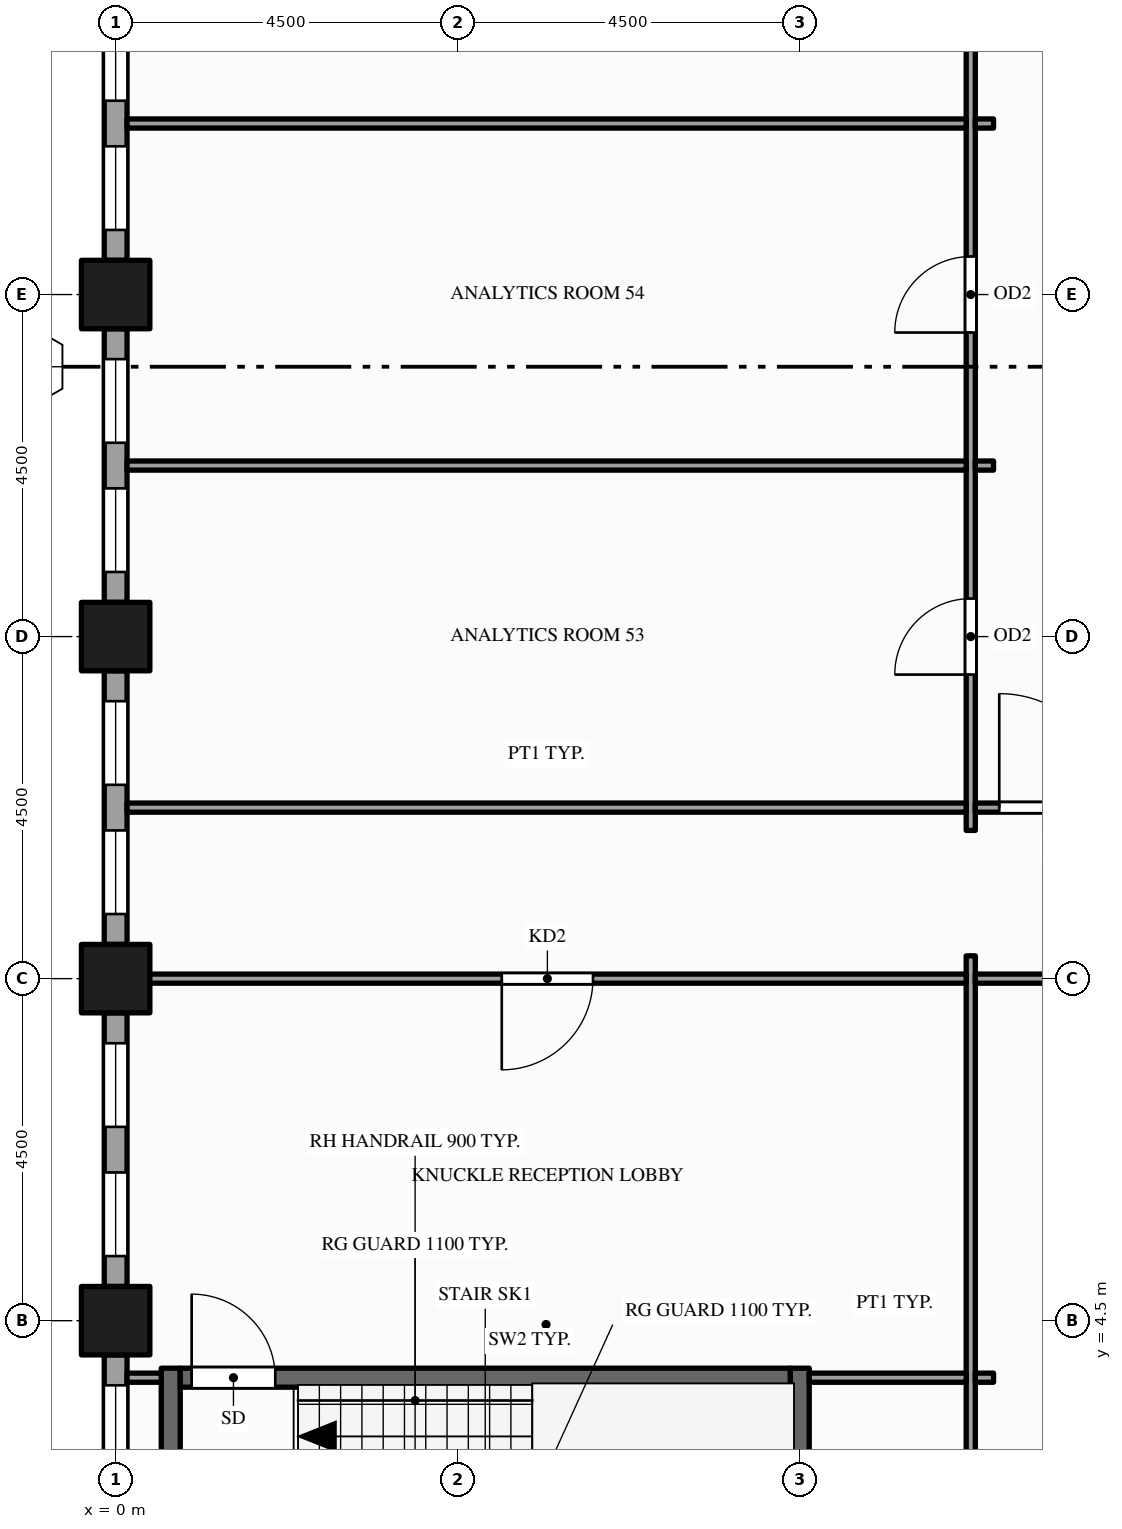
"""IFC4 building model, lengths in metres.
Left out: names, types, materials, properties, quantities, classifications, styles, units other than length and angle.
Written with IfcOpenShell. Run it as: python <this file> out.ifc"""

import sys

from ifc_helpers import new_model, si_unit, direction, frame, frame_2d, origin, origin_2d, place, context, subcontext, project, spatial, rectangle, hollow_rectangle, extrude, element, fill, save


model = new_model("IFC4")
c1 = context("Model", 3, precision=1e-05, world=origin(), true_north=direction((0.0, 1.0)))
c2 = subcontext(c1, "Body", "Model", "MODEL_VIEW")
j1 = project(units=[si_unit("LENGTHUNIT", "METRE"), si_unit("PLANEANGLEUNIT", "RADIAN")], contexts=[c1])
p1 = place(None, origin())
s1 = spatial("IfcSite", under=j1, at=p1, CompositionType="ELEMENT")
p2 = place(p1, origin())
s2 = spatial("IfcBuilding", under=s1, at=p2, CompositionType="ELEMENT")
p3 = place(p2, frame((0.0, 0.0, 151.0)))
s3 = spatial("IfcBuildingStorey", under=s2, at=p3, CompositionType="ELEMENT", Elevation=151.0)
for number, where, z_axis, x_axis in (
    (1, (0.0, 4.5, -0.15), (0.0, 0.0, 1.0), (1.0, 0.0, 0.0)),
    (2, (0.0, 9.0, -0.15), (0.0, 0.0, 1.0), (1.0, 0.0, 0.0)),
    (3, (0.0, 13.5, -0.15), (0.0, 0.0, 1.0), (1.0, 0.0, 0.0)),
    (4, (0.0, 18.0, -0.15), (0.0, 0.0, 1.0), (1.0, 0.0, 0.0)),
):
    element("IfcColumn", number, at=place(p3, frame(where, z_axis=z_axis, x_axis=x_axis)), inside=s3, PredefinedType="COLUMN", context=c2, shape_type="SweptSolid", body=[
        extrude(hollow_rectangle(XDim=0.9, YDim=0.9, WallThickness=0.045, at=origin_2d()), origin(), (0.0, 0.0, 1.0), 4.0),
    ])
p4 = place(p3, frame((0.0, 22.05, 0.0), z_axis=(0.0, 0.0, 1.0), x_axis=(0.0, -1.0, 0.0)))
e5 = element("IfcWall", 5, at=p4, inside=s3, PredefinedType="STANDARD", context=c2, shape_type="SweptSolid", body=[
    extrude(rectangle(XDim=3.6, YDim=0.3, at=frame_2d((1.8, 0.0))), origin(), (0.0, 0.0, 1.0), 3.149),
])
p5 = place(p4, frame((0.4, 0.0, 0.9)))
e6 = element("IfcOpeningElement", 6, at=p5, cuts=e5, PredefinedType="OPENING", context=c2, shape_type="SweptSolid", body=[
    extrude(rectangle(XDim=1.1, YDim=2.0, at=frame_2d((0.55, 1.0))), frame((0.0, 0.16, 0.0), z_axis=(0.0, -1.0, 0.0), x_axis=(1.0, 0.0, 0.0)), (0.0, 0.0, 1.0), 0.32),
])
p6 = place(p4, frame((2.1, 0.0, 0.9)))
e7 = element("IfcOpeningElement", 7, at=p6, cuts=e5, PredefinedType="OPENING", context=c2, shape_type="SweptSolid", body=[
    extrude(rectangle(XDim=1.1, YDim=2.0, at=frame_2d((0.55, 1.0))), frame((0.0, 0.16, 0.0), z_axis=(0.0, -1.0, 0.0), x_axis=(1.0, 0.0, 0.0)), (0.0, 0.0, 1.0), 0.32),
])
p7 = place(p3, frame((0.0, 17.55, 0.0), z_axis=(0.0, 0.0, 1.0), x_axis=(0.0, -1.0, 0.0)))
e8 = element("IfcWall", 8, at=p7, inside=s3, PredefinedType="STANDARD", context=c2, shape_type="SweptSolid", body=[
    extrude(rectangle(XDim=3.6, YDim=0.3, at=frame_2d((1.8, 0.0))), origin(), (0.0, 0.0, 1.0), 3.149),
])
p8 = place(p7, frame((0.4, 0.0, 0.9)))
e9 = element("IfcOpeningElement", 9, at=p8, cuts=e8, PredefinedType="OPENING", context=c2, shape_type="SweptSolid", body=[
    extrude(rectangle(XDim=1.1, YDim=2.0, at=frame_2d((0.55, 1.0))), frame((0.0, 0.16, 0.0), z_axis=(0.0, -1.0, 0.0), x_axis=(1.0, 0.0, 0.0)), (0.0, 0.0, 1.0), 0.32),
])
p9 = place(p7, frame((2.1, 0.0, 0.9)))
e10 = element("IfcOpeningElement", 10, at=p9, cuts=e8, PredefinedType="OPENING", context=c2, shape_type="SweptSolid", body=[
    extrude(rectangle(XDim=1.1, YDim=2.0, at=frame_2d((0.55, 1.0))), frame((0.0, 0.16, 0.0), z_axis=(0.0, -1.0, 0.0), x_axis=(1.0, 0.0, 0.0)), (0.0, 0.0, 1.0), 0.32),
])
p10 = place(p3, frame((0.0, 13.05, 0.0), z_axis=(0.0, 0.0, 1.0), x_axis=(0.0, -1.0, 0.0)))
e11 = element("IfcWall", 11, at=p10, inside=s3, PredefinedType="STANDARD", context=c2, shape_type="SweptSolid", body=[
    extrude(rectangle(XDim=3.6, YDim=0.3, at=frame_2d((1.8, 0.0))), origin(), (0.0, 0.0, 1.0), 3.149),
])
p11 = place(p10, frame((0.4, 0.0, 0.9)))
e12 = element("IfcOpeningElement", 12, at=p11, cuts=e11, PredefinedType="OPENING", context=c2, shape_type="SweptSolid", body=[
    extrude(rectangle(XDim=1.1, YDim=2.0, at=frame_2d((0.55, 1.0))), frame((0.0, 0.16, 0.0), z_axis=(0.0, -1.0, 0.0), x_axis=(1.0, 0.0, 0.0)), (0.0, 0.0, 1.0), 0.32),
])
p12 = place(p10, frame((2.1, 0.0, 0.9)))
e13 = element("IfcOpeningElement", 13, at=p12, cuts=e11, PredefinedType="OPENING", context=c2, shape_type="SweptSolid", body=[
    extrude(rectangle(XDim=1.1, YDim=2.0, at=frame_2d((0.55, 1.0))), frame((0.0, 0.16, 0.0), z_axis=(0.0, -1.0, 0.0), x_axis=(1.0, 0.0, 0.0)), (0.0, 0.0, 1.0), 0.32),
])
p13 = place(p3, frame((0.0, 8.55, 0.0), z_axis=(0.0, 0.0, 1.0), x_axis=(0.0, -1.0, 0.0)))
e14 = element("IfcWall", 14, at=p13, inside=s3, PredefinedType="STANDARD", context=c2, shape_type="SweptSolid", body=[
    extrude(rectangle(XDim=3.6, YDim=0.3, at=frame_2d((1.8, 0.0))), origin(), (0.0, 0.0, 1.0), 3.149),
])
p14 = place(p13, frame((0.4, 0.0, 0.9)))
e15 = element("IfcOpeningElement", 15, at=p14, cuts=e14, PredefinedType="OPENING", context=c2, shape_type="SweptSolid", body=[
    extrude(rectangle(XDim=1.1, YDim=2.0, at=frame_2d((0.55, 1.0))), frame((0.0, 0.16, 0.0), z_axis=(0.0, -1.0, 0.0), x_axis=(1.0, 0.0, 0.0)), (0.0, 0.0, 1.0), 0.32),
])
p15 = place(p13, frame((2.1, 0.0, 0.9)))
e16 = element("IfcOpeningElement", 16, at=p15, cuts=e14, PredefinedType="OPENING", context=c2, shape_type="SweptSolid", body=[
    extrude(rectangle(XDim=1.1, YDim=2.0, at=frame_2d((0.55, 1.0))), frame((0.0, 0.16, 0.0), z_axis=(0.0, -1.0, 0.0), x_axis=(1.0, 0.0, 0.0)), (0.0, 0.0, 1.0), 0.32),
])
p16 = place(p3, frame((0.0, 4.05, 0.0), z_axis=(0.0, 0.0, 1.0), x_axis=(0.0, -1.0, 0.0)))
e17 = element("IfcWall", 17, at=p16, inside=s3, PredefinedType="STANDARD", context=c2, shape_type="SweptSolid", body=[
    extrude(rectangle(XDim=3.6, YDim=0.3, at=frame_2d((1.8, 0.0))), origin(), (0.0, 0.0, 1.0), 3.149),
])
p17 = place(p16, frame((0.4, 0.0, 0.9)))
e18 = element("IfcOpeningElement", 18, at=p17, cuts=e17, PredefinedType="OPENING", context=c2, shape_type="SweptSolid", body=[
    extrude(rectangle(XDim=1.1, YDim=2.0, at=frame_2d((0.55, 1.0))), frame((0.0, 0.16, 0.0), z_axis=(0.0, -1.0, 0.0), x_axis=(1.0, 0.0, 0.0)), (0.0, 0.0, 1.0), 0.32),
])
p18 = place(p16, frame((2.1, 0.0, 0.9)))
e19 = element("IfcOpeningElement", 19, at=p18, cuts=e17, PredefinedType="OPENING", context=c2, shape_type="SweptSolid", body=[
    extrude(rectangle(XDim=1.1, YDim=2.0, at=frame_2d((0.55, 1.0))), frame((0.0, 0.16, 0.0), z_axis=(0.0, -1.0, 0.0), x_axis=(1.0, 0.0, 0.0)), (0.0, 0.0, 1.0), 0.32),
])
p19 = place(p3, frame((0.725, 0.6, 0.0), z_axis=(0.0, 0.0, 1.0), x_axis=(0.0, 1.0, 0.0)))
e20 = element("IfcWall", 20, at=p19, inside=s3, PredefinedType="SHEAR", context=c2, shape_type="SweptSolid", body=[
    extrude(rectangle(XDim=3.275, YDim=0.25, at=frame_2d((1.637, 0.0))), origin(), (0.0, 0.0, 1.0), 3.85),
])
p20 = place(p3, frame((9.0, 0.45, 0.0), z_axis=(0.0, 0.0, 1.0), x_axis=(0.0, 1.0, 0.0)))
e21 = element("IfcWall", 21, at=p20, inside=s3, PredefinedType="SHEAR", context=c2, shape_type="SweptSolid", body=[
    extrude(rectangle(XDim=3.425, YDim=0.25, at=frame_2d((1.712, 0.0))), origin(), (0.0, 0.0, 1.0), 3.85),
])
p21 = place(p3, frame((11.25, 0.15, 0.0), z_axis=(0.0, 0.0, 1.0), x_axis=(0.0, 1.0, 0.0)))
e22 = element("IfcWall", 22, at=p21, inside=s3, PredefinedType="PARTITIONING", context=c2, shape_type="SweptSolid", body=[
    extrude(rectangle(XDim=9.15, YDim=0.12, at=frame_2d((4.575, 0.0))), origin(), (0.0, 0.0, 1.0), 2.87),
])
p22 = place(p3, frame((11.25, 10.95, 0.0), z_axis=(0.0, 0.0, 1.0), x_axis=(0.0, 1.0, 0.0)))
e23 = element("IfcWall", 23, at=p22, inside=s3, PredefinedType="PARTITIONING", context=c2, shape_type="SweptSolid", body=[
    extrude(rectangle(XDim=20.85, YDim=0.12, at=frame_2d((10.425, 0.0))), origin(), (0.0, 0.0, 1.0), 2.6),
])
p23 = place(p22, frame((2.05, 0.0, 0.0)))
e24 = element("IfcOpeningElement", 24, at=p23, cuts=e23, PredefinedType="OPENING", context=c2, shape_type="SweptSolid", body=[
    extrude(rectangle(XDim=1.0, YDim=2.1, at=frame_2d((0.5, 1.05))), frame((0.0, 0.07, 0.0), z_axis=(0.0, -1.0, 0.0), x_axis=(1.0, 0.0, 0.0)), (0.0, 0.0, 1.0), 0.14),
])
p24 = place(p22, frame((6.55, 0.0, 0.0)))
e25 = element("IfcOpeningElement", 25, at=p24, cuts=e23, PredefinedType="OPENING", context=c2, shape_type="SweptSolid", body=[
    extrude(rectangle(XDim=1.0, YDim=2.1, at=frame_2d((0.5, 1.05))), frame((0.0, 0.07, 0.0), z_axis=(0.0, -1.0, 0.0), x_axis=(1.0, 0.0, 0.0)), (0.0, 0.0, 1.0), 0.14),
])
p25 = place(p22, frame((12.205, 0.0, 0.0)))
e26 = element("IfcOpeningElement", 26, at=p25, cuts=e23, PredefinedType="OPENING", context=c2, shape_type="SweptSolid", body=[
    extrude(rectangle(XDim=1.0, YDim=2.1, at=frame_2d((0.5, 1.05))), frame((0.0, 0.07, 0.0), z_axis=(0.0, -1.0, 0.0), x_axis=(1.0, 0.0, 0.0)), (0.0, 0.0, 1.0), 0.14),
])
p26 = place(p3, frame((0.15, 3.75, 0.0), z_axis=(0.0, 0.0, 1.0), x_axis=(1.0, 0.0, 0.0)))
e27 = element("IfcWall", 27, at=p26, inside=s3, PredefinedType="PARTITIONING", context=c2, shape_type="SweptSolid", body=[
    extrude(rectangle(XDim=0.45, YDim=0.12, at=frame_2d((0.225, 0.0))), origin(), (0.0, 0.0, 1.0), 3.85),
])
p27 = place(p3, frame((0.85, 3.75, 0.0), z_axis=(0.0, 0.0, 1.0), x_axis=(1.0, 0.0, 0.0)))
e28 = element("IfcWall", 28, at=p27, inside=s3, PredefinedType="SHEAR", context=c2, shape_type="SweptSolid", body=[
    extrude(rectangle(XDim=8.025, YDim=0.25, at=frame_2d((4.012, 0.0))), origin(), (0.0, 0.0, 1.0), 3.85),
])
p28 = place(p27, frame((0.15, 0.0, 0.0)))
e29 = element("IfcOpeningElement", 29, at=p28, cuts=e28, PredefinedType="OPENING", context=c2, shape_type="SweptSolid", body=[
    extrude(rectangle(XDim=1.1, YDim=2.1, at=frame_2d((0.55, 1.05))), frame((0.0, 0.135, 0.0), z_axis=(0.0, -1.0, 0.0), x_axis=(1.0, 0.0, 0.0)), (0.0, 0.0, 1.0), 0.27),
])
p29 = place(p3, frame((9.125, 3.75, 0.0), z_axis=(0.0, 0.0, 1.0), x_axis=(1.0, 0.0, 0.0)))
e30 = element("IfcWall", 30, at=p29, inside=s3, PredefinedType="PARTITIONING", context=c2, shape_type="SweptSolid", body=[
    extrude(rectangle(XDim=2.065, YDim=0.12, at=frame_2d((1.032, 0.0))), origin(), (0.0, 0.0, 1.0), 2.87),
])
p30 = place(p3, frame((11.31, 3.75, 0.0), z_axis=(0.0, 0.0, 1.0), x_axis=(1.0, 0.0, 0.0)))
e31 = element("IfcWall", 31, at=p30, inside=s3, PredefinedType="PARTITIONING", context=c2, shape_type="SweptSolid", body=[
    extrude(rectangle(XDim=0.24, YDim=0.12, at=frame_2d((0.12, 0.0))), origin(), (0.0, 0.0, 1.0), 2.87),
])
p31 = place(p3, frame((0.15, 9.0, 0.0), z_axis=(0.0, 0.0, 1.0), x_axis=(1.0, 0.0, 0.0)))
e32 = element("IfcWall", 32, at=p31, inside=s3, PredefinedType="PARTITIONING", context=c2, shape_type="SweptSolid", body=[
    extrude(rectangle(XDim=11.04, YDim=0.12, at=frame_2d((5.52, 0.0))), origin(), (0.0, 0.0, 1.0), 2.87),
])
p32 = place(p31, frame((4.93, 0.0, 0.0)))
e33 = element("IfcOpeningElement", 33, at=p32, cuts=e32, PredefinedType="OPENING", context=c2, shape_type="SweptSolid", body=[
    extrude(rectangle(XDim=1.2, YDim=2.1, at=frame_2d((0.6, 1.05))), frame((0.0, 0.07, 0.0), z_axis=(0.0, -1.0, 0.0), x_axis=(1.0, 0.0, 0.0)), (0.0, 0.0, 1.0), 0.14),
])
p33 = place(p3, frame((11.31, 9.0, 0.0), z_axis=(0.0, 0.0, 1.0), x_axis=(1.0, 0.0, 0.0)))
e34 = element("IfcWall", 34, at=p33, inside=s3, PredefinedType="PARTITIONING", context=c2, shape_type="SweptSolid", body=[
    extrude(rectangle(XDim=4.38, YDim=0.12, at=frame_2d((2.19, 0.0))), origin(), (0.0, 0.0, 1.0), 2.87),
])
p34 = place(p33, frame((1.69, 0.0, 0.0)))
e35 = element("IfcOpeningElement", 35, at=p34, cuts=e34, PredefinedType="OPENING", context=c2, shape_type="SweptSolid", body=[
    extrude(rectangle(XDim=1.0, YDim=2.1, at=frame_2d((0.5, 1.05))), frame((0.0, 0.07, 0.0), z_axis=(0.0, -1.0, 0.0), x_axis=(1.0, 0.0, 0.0)), (0.0, 0.0, 1.0), 0.14),
])
p35 = place(p3, frame((0.15, 11.25, 0.0), z_axis=(0.0, 0.0, 1.0), x_axis=(1.0, 0.0, 0.0)))
e36 = element("IfcWall", 36, at=p35, inside=s3, PredefinedType="PARTITIONING", context=c2, shape_type="SweptSolid", body=[
    extrude(rectangle(XDim=11.04, YDim=0.12, at=frame_2d((5.52, 0.0))), origin(), (0.0, 0.0, 1.0), 2.87),
])
p36 = place(p3, frame((11.31, 11.25, 0.0), z_axis=(0.0, 0.0, 1.0), x_axis=(1.0, 0.0, 0.0)))
e37 = element("IfcWall", 37, at=p36, inside=s3, PredefinedType="PARTITIONING", context=c2, shape_type="SweptSolid", body=[
    extrude(rectangle(XDim=2.13, YDim=0.12, at=frame_2d((1.065, 0.0))), origin(), (0.0, 0.0, 1.0), 2.87),
])
p37 = place(p36, frame((0.315, 0.0, 0.0)))
e38 = element("IfcOpeningElement", 38, at=p37, cuts=e37, PredefinedType="OPENING", context=c2, shape_type="SweptSolid", body=[
    extrude(rectangle(XDim=1.5, YDim=2.1, at=frame_2d((0.75, 1.05))), frame((0.0, 0.07, 0.0), z_axis=(0.0, -1.0, 0.0), x_axis=(1.0, 0.0, 0.0)), (0.0, 0.0, 1.0), 0.14),
])
p38 = place(p3, frame((0.15, 15.75, 0.0), z_axis=(0.0, 0.0, 1.0), x_axis=(1.0, 0.0, 0.0)))
e39 = element("IfcWall", 39, at=p38, inside=s3, PredefinedType="PARTITIONING", context=c2, shape_type="SweptSolid", body=[
    extrude(rectangle(XDim=11.04, YDim=0.12, at=frame_2d((5.52, 0.0))), origin(), (0.0, 0.0, 1.0), 2.87),
])
p39 = place(p3, frame((11.31, 15.75, 0.0), z_axis=(0.0, 0.0, 1.0), x_axis=(1.0, 0.0, 0.0)))
e40 = element("IfcWall", 40, at=p39, inside=s3, PredefinedType="PARTITIONING", context=c2, shape_type="SweptSolid", body=[
    extrude(rectangle(XDim=0.24, YDim=0.12, at=frame_2d((0.12, 0.0))), origin(), (0.0, 0.0, 1.0), 2.87),
])
p40 = place(p3, frame((0.15, 20.25, 0.0), z_axis=(0.0, 0.0, 1.0), x_axis=(1.0, 0.0, 0.0)))
e41 = element("IfcWall", 41, at=p40, inside=s3, PredefinedType="PARTITIONING", context=c2, shape_type="SweptSolid", body=[
    extrude(rectangle(XDim=11.04, YDim=0.12, at=frame_2d((5.52, 0.0))), origin(), (0.0, 0.0, 1.0), 2.87),
])
p41 = place(p3, frame((11.31, 20.25, 0.0), z_axis=(0.0, 0.0, 1.0), x_axis=(1.0, 0.0, 0.0)))
e42 = element("IfcWall", 42, at=p41, inside=s3, PredefinedType="PARTITIONING", context=c2, shape_type="SweptSolid", body=[
    extrude(rectangle(XDim=0.24, YDim=0.12, at=frame_2d((0.12, 0.0))), origin(), (0.0, 0.0, 1.0), 2.87),
])
p42 = place(p5, origin())
e43 = element("IfcWindow", 43, at=p42, inside=s3, PartitioningType="SINGLE_PANEL", PredefinedType="WINDOW", context=c2, shape_type="SweptSolid", body=[
    extrude(rectangle(XDim=1.1, YDim=2.0, at=frame_2d((0.55, 1.0))), frame((0.0, 0.03, 0.0), z_axis=(0.0, -1.0, 0.0), x_axis=(1.0, 0.0, 0.0)), (0.0, 0.0, 1.0), 0.06),
])
fill(e6, e43)
p43 = place(p6, origin())
e44 = element("IfcWindow", 44, at=p43, inside=s3, PartitioningType="SINGLE_PANEL", PredefinedType="WINDOW", context=c2, shape_type="SweptSolid", body=[
    extrude(rectangle(XDim=1.1, YDim=2.0, at=frame_2d((0.55, 1.0))), frame((0.0, 0.03, 0.0), z_axis=(0.0, -1.0, 0.0), x_axis=(1.0, 0.0, 0.0)), (0.0, 0.0, 1.0), 0.06),
])
fill(e7, e44)
p44 = place(p8, origin())
e45 = element("IfcWindow", 45, at=p44, inside=s3, PartitioningType="SINGLE_PANEL", PredefinedType="WINDOW", context=c2, shape_type="SweptSolid", body=[
    extrude(rectangle(XDim=1.1, YDim=2.0, at=frame_2d((0.55, 1.0))), frame((0.0, 0.03, 0.0), z_axis=(0.0, -1.0, 0.0), x_axis=(1.0, 0.0, 0.0)), (0.0, 0.0, 1.0), 0.06),
])
fill(e9, e45)
p45 = place(p9, origin())
e46 = element("IfcWindow", 46, at=p45, inside=s3, PartitioningType="SINGLE_PANEL", PredefinedType="WINDOW", context=c2, shape_type="SweptSolid", body=[
    extrude(rectangle(XDim=1.1, YDim=2.0, at=frame_2d((0.55, 1.0))), frame((0.0, 0.03, 0.0), z_axis=(0.0, -1.0, 0.0), x_axis=(1.0, 0.0, 0.0)), (0.0, 0.0, 1.0), 0.06),
])
fill(e10, e46)
p46 = place(p11, origin())
e47 = element("IfcWindow", 47, at=p46, inside=s3, PartitioningType="SINGLE_PANEL", PredefinedType="WINDOW", context=c2, shape_type="SweptSolid", body=[
    extrude(rectangle(XDim=1.1, YDim=2.0, at=frame_2d((0.55, 1.0))), frame((0.0, 0.03, 0.0), z_axis=(0.0, -1.0, 0.0), x_axis=(1.0, 0.0, 0.0)), (0.0, 0.0, 1.0), 0.06),
])
fill(e12, e47)
p47 = place(p12, origin())
e48 = element("IfcWindow", 48, at=p47, inside=s3, PartitioningType="SINGLE_PANEL", PredefinedType="WINDOW", context=c2, shape_type="SweptSolid", body=[
    extrude(rectangle(XDim=1.1, YDim=2.0, at=frame_2d((0.55, 1.0))), frame((0.0, 0.03, 0.0), z_axis=(0.0, -1.0, 0.0), x_axis=(1.0, 0.0, 0.0)), (0.0, 0.0, 1.0), 0.06),
])
fill(e13, e48)
p48 = place(p14, origin())
e49 = element("IfcWindow", 49, at=p48, inside=s3, PartitioningType="SINGLE_PANEL", PredefinedType="WINDOW", context=c2, shape_type="SweptSolid", body=[
    extrude(rectangle(XDim=1.1, YDim=2.0, at=frame_2d((0.55, 1.0))), frame((0.0, 0.03, 0.0), z_axis=(0.0, -1.0, 0.0), x_axis=(1.0, 0.0, 0.0)), (0.0, 0.0, 1.0), 0.06),
])
fill(e15, e49)
p49 = place(p15, origin())
e50 = element("IfcWindow", 50, at=p49, inside=s3, PartitioningType="SINGLE_PANEL", PredefinedType="WINDOW", context=c2, shape_type="SweptSolid", body=[
    extrude(rectangle(XDim=1.1, YDim=2.0, at=frame_2d((0.55, 1.0))), frame((0.0, 0.03, 0.0), z_axis=(0.0, -1.0, 0.0), x_axis=(1.0, 0.0, 0.0)), (0.0, 0.0, 1.0), 0.06),
])
fill(e16, e50)
p50 = place(p17, origin())
e51 = element("IfcWindow", 51, at=p50, inside=s3, PartitioningType="SINGLE_PANEL", PredefinedType="WINDOW", context=c2, shape_type="SweptSolid", body=[
    extrude(rectangle(XDim=1.1, YDim=2.0, at=frame_2d((0.55, 1.0))), frame((0.0, 0.03, 0.0), z_axis=(0.0, -1.0, 0.0), x_axis=(1.0, 0.0, 0.0)), (0.0, 0.0, 1.0), 0.06),
])
fill(e18, e51)
p51 = place(p28, origin())
e52 = element("IfcDoor", 52, at=p51, inside=s3, OperationType="SINGLE_SWING_LEFT", PredefinedType="DOOR", context=c2, shape_type="SweptSolid", body=[
    extrude(rectangle(XDim=1.1, YDim=2.1, at=frame_2d((0.55, 1.05))), frame((0.0, 0.025, 0.0), z_axis=(0.0, -1.0, 0.0), x_axis=(1.0, 0.0, 0.0)), (0.0, 0.0, 1.0), 0.05),
])
fill(e29, e52)
p52 = place(p32, origin())
e53 = element("IfcDoor", 53, at=p52, inside=s3, OperationType="SINGLE_SWING_LEFT", PredefinedType="DOOR", context=c2, shape_type="SweptSolid", body=[
    extrude(rectangle(XDim=1.2, YDim=2.1, at=frame_2d((0.6, 1.05))), frame((0.0, 0.025, 0.0), z_axis=(0.0, -1.0, 0.0), x_axis=(1.0, 0.0, 0.0)), (0.0, 0.0, 1.0), 0.05),
])
fill(e33, e53)
p53 = place(p37, origin())
e54 = element("IfcDoor", 54, at=p53, inside=s3, OperationType="SINGLE_SWING_LEFT", PredefinedType="DOOR", context=c2, shape_type="SweptSolid", body=[
    extrude(rectangle(XDim=1.5, YDim=2.1, at=frame_2d((0.75, 1.05))), frame((0.0, 0.025, 0.0), z_axis=(0.0, -1.0, 0.0), x_axis=(1.0, 0.0, 0.0)), (0.0, 0.0, 1.0), 0.05),
])
fill(e38, e54)
p54 = place(p23, origin())
e55 = element("IfcDoor", 55, at=p54, inside=s3, OperationType="SINGLE_SWING_LEFT", PredefinedType="DOOR", context=c2, shape_type="SweptSolid", body=[
    extrude(rectangle(XDim=1.0, YDim=2.1, at=frame_2d((0.5, 1.05))), frame((0.0, 0.025, 0.0), z_axis=(0.0, -1.0, 0.0), x_axis=(1.0, 0.0, 0.0)), (0.0, 0.0, 1.0), 0.05),
])
fill(e24, e55)
p55 = place(p24, origin())
e56 = element("IfcDoor", 56, at=p55, inside=s3, OperationType="SINGLE_SWING_LEFT", PredefinedType="DOOR", context=c2, shape_type="SweptSolid", body=[
    extrude(rectangle(XDim=1.0, YDim=2.1, at=frame_2d((0.5, 1.05))), frame((0.0, 0.025, 0.0), z_axis=(0.0, -1.0, 0.0), x_axis=(1.0, 0.0, 0.0)), (0.0, 0.0, 1.0), 0.05),
])
fill(e25, e56)
save(model, sys.argv[1])
